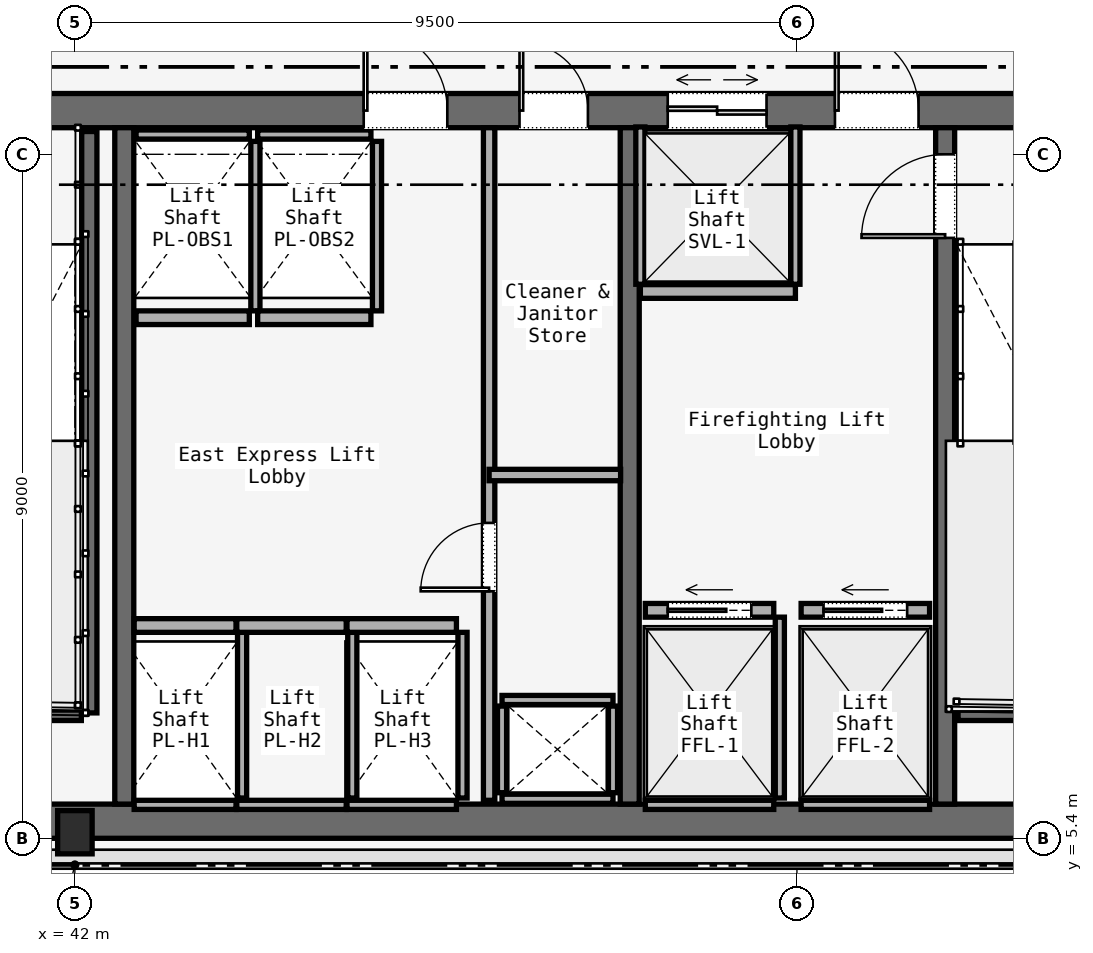
"""IFC4 building model, lengths in metres.
Left out: names, types, materials, properties, quantities, classifications, styles, units other than length and angle.
Written with IfcOpenShell. Run it as: python <this file> out.ifc"""

import sys

from ifc_helpers import new_model, si_unit, direction, frame, frame_2d, origin, origin_2d, place, context, subcontext, project, spatial, rectangle, i_section, extrude, element, fill, save


model = new_model("IFC4")
c1 = context("Model", 3, precision=1e-05, world=origin(), true_north=direction((0.0, 1.0)))
c2 = subcontext(c1, "Body", "Model", "MODEL_VIEW")
j1 = project(units=[si_unit("LENGTHUNIT", "METRE"), si_unit("PLANEANGLEUNIT", "RADIAN")], contexts=[c1])
p1 = place(None, origin())
s1 = spatial("IfcSite", under=j1, at=p1, CompositionType="ELEMENT")
p2 = place(p1, origin())
s2 = spatial("IfcBuilding", under=s1, at=p2, CompositionType="ELEMENT")
p3 = place(p2, frame((0.0, 0.0, 36.0)))
s3 = spatial("IfcBuildingStorey", under=s2, at=p3, CompositionType="ELEMENT", Elevation=36.0)
p4 = place(p3, frame((26.45, 14.975, 0.0), z_axis=(0.0, 0.0, 1.0), x_axis=(1.0, 0.0, 0.0)))
e1 = element("IfcWall", 1, at=p4, inside=s3, PredefinedType="SOLIDWALL", context=c2, shape_type="SweptSolid", body=[
    extrude(rectangle(XDim=31.1, YDim=0.45, at=frame_2d((15.55, 0.0))), origin(), (0.0, 0.0, 1.0), 3.58),
])
p5 = place(p4, frame((1.65, 0.0, 0.0)))
e2 = element("IfcOpeningElement", 2, at=p5, cuts=e1, PredefinedType="OPENING", context=c2, shape_type="SweptSolid", body=[
    extrude(rectangle(XDim=1.1, YDim=2.2, at=frame_2d((0.55, 1.1))), frame((0.0, 0.225, 0.0), z_axis=(0.0, -1.0, 0.0), x_axis=(1.0, 0.0, 0.0)), (0.0, 0.0, 1.0), 0.45),
])
p6 = place(p4, frame((13.65, 0.0, 0.0)))
e3 = element("IfcOpeningElement", 3, at=p6, cuts=e1, PredefinedType="OPENING", context=c2, shape_type="SweptSolid", body=[
    extrude(rectangle(XDim=1.1, YDim=2.2, at=frame_2d((0.55, 1.1))), frame((0.0, 0.225, 0.0), z_axis=(0.0, -1.0, 0.0), x_axis=(1.0, 0.0, 0.0)), (0.0, 0.0, 1.0), 0.45),
])
p7 = place(p4, frame((25.55, 0.0, 0.0)))
e4 = element("IfcOpeningElement", 4, at=p7, cuts=e1, PredefinedType="OPENING", context=c2, shape_type="SweptSolid", body=[
    extrude(rectangle(XDim=1.1, YDim=2.2, at=frame_2d((0.55, 1.1))), frame((0.0, 0.225, 0.0), z_axis=(0.0, -1.0, 0.0), x_axis=(1.0, 0.0, 0.0)), (0.0, 0.0, 1.0), 0.45),
])
p8 = place(p4, frame((10.7, 0.0, 0.0)))
e5 = element("IfcOpeningElement", 5, at=p8, cuts=e1, PredefinedType="OPENING", context=c2, shape_type="SweptSolid", body=[
    extrude(rectangle(XDim=1.4, YDim=2.2, at=frame_2d((0.7, 1.1))), frame((0.0, 0.225, 0.0), z_axis=(0.0, -1.0, 0.0), x_axis=(1.0, 0.0, 0.0)), (0.0, 0.0, 1.0), 0.45),
])
p9 = place(p4, frame((19.35, 0.0, 0.0)))
e6 = element("IfcOpeningElement", 6, at=p9, cuts=e1, PredefinedType="OPENING", context=c2, shape_type="SweptSolid", body=[
    extrude(rectangle(XDim=1.1, YDim=2.2, at=frame_2d((0.55, 1.1))), frame((0.0, 0.225, 0.0), z_axis=(0.0, -1.0, 0.0), x_axis=(1.0, 0.0, 0.0)), (0.0, 0.0, 1.0), 0.45),
])
p10 = place(p4, frame((21.4, 0.0, 0.0)))
e7 = element("IfcOpeningElement", 7, at=p10, cuts=e1, PredefinedType="OPENING", context=c2, shape_type="SweptSolid", body=[
    extrude(rectangle(XDim=0.9, YDim=2.1, at=frame_2d((0.45, 1.05))), frame((0.0, 0.225, 0.0), z_axis=(0.0, -1.0, 0.0), x_axis=(1.0, 0.0, 0.0)), (0.0, 0.0, 1.0), 0.45),
])
p11 = place(p4, frame((23.35, 0.0, 0.0)))
e8 = element("IfcOpeningElement", 8, at=p11, cuts=e1, PredefinedType="OPENING", context=c2, shape_type="SweptSolid", body=[
    extrude(rectangle(XDim=1.3, YDim=2.3, at=frame_2d((0.65, 1.15))), frame((0.0, 0.225, 0.0), z_axis=(0.0, -1.0, 0.0), x_axis=(1.0, 0.0, 0.0)), (0.0, 0.0, 1.0), 0.45),
])
p12 = place(p3, frame((26.45, 5.625, 0.0), z_axis=(0.0, 0.0, 1.0), x_axis=(1.0, 0.0, 0.0)))
e9 = element("IfcWall", 9, at=p12, inside=s3, PredefinedType="SOLIDWALL", context=c2, shape_type="SweptSolid", body=[
    extrude(rectangle(XDim=31.1, YDim=0.45, at=frame_2d((15.55, 0.0))), origin(), (0.0, 0.0, 1.0), 3.58),
])
for number, where, z_axis, x_axis in (
    (10, (42.65, 5.85, 0.0), (0.0, 0.0, 1.0), (0.0, 1.0, 0.0)),
    (11, (49.3, 5.85, 0.0), (0.0, 0.0, 1.0), (0.0, 1.0, 0.0)),
):
    element("IfcWall", number, at=place(p3, frame(where, z_axis=z_axis, x_axis=x_axis)), inside=s3, PredefinedType="SOLIDWALL", context=c2, shape_type="SweptSolid", body=[
        extrude(rectangle(XDim=8.9, YDim=0.25, at=frame_2d((4.45, 0.0))), origin(), (0.0, 0.0, 1.0), 3.58),
    ])
p13 = place(p3, frame((53.45, 5.85, 0.0), z_axis=(0.0, 0.0, 1.0), x_axis=(0.0, 1.0, 0.0)))
e12 = element("IfcWall", 12, at=p13, inside=s3, PredefinedType="SOLIDWALL", context=c2, shape_type="SweptSolid", body=[
    extrude(rectangle(XDim=8.9, YDim=0.25, at=frame_2d((4.45, 0.0))), origin(), (0.0, 0.0, 1.0), 3.58),
])
p14 = place(p13, frame((7.45, 0.0, 0.0)))
e13 = element("IfcOpeningElement", 13, at=p14, cuts=e12, PredefinedType="OPENING", context=c2, shape_type="SweptSolid", body=[
    extrude(rectangle(XDim=1.1, YDim=2.2, at=frame_2d((0.55, 1.1))), frame((0.0, 0.125, 0.0), z_axis=(0.0, -1.0, 0.0), x_axis=(1.0, 0.0, 0.0)), (0.0, 0.0, 1.0), 0.25),
])
p15 = place(p3, frame((42.0, 5.48, 0.0), z_axis=(0.0, 0.0, 1.0), x_axis=(1.0, 0.0, 0.0)))
e14 = element("IfcColumn", 14, at=p15, inside=s3, PredefinedType="COLUMN", context=c2, shape_type="SweptSolid", body=[
    extrude(i_section(OverallWidth=0.454, OverallDepth=0.569, WebThickness=0.078, FlangeThickness=0.08, FilletRadius=0.015, at=origin_2d()), origin(), (0.0, 0.0, 1.0), 3.58),
])
p16 = place(p3, frame((42.19, 14.7, 0.0), z_axis=(0.0, 0.0, 1.0), x_axis=(0.0, -1.0, 0.0)))
e15 = element("IfcWall", 15, at=p16, inside=s3, PredefinedType="SOLIDWALL", context=c2, shape_type="SweptSolid", body=[
    extrude(rectangle(XDim=7.65, YDim=0.2, at=frame_2d((3.825, 0.0))), origin(), (0.0, 0.0, 1.0), 3.8),
])
for number, where, z_axis, x_axis in (
    (16, (38.97, 7.05, 0.0), (0.0, 0.0, 1.0), (1.0, 0.0, 0.0)),
    (17, (53.62, 7.05, 0.0), (0.0, 0.0, 1.0), (1.0, 0.0, 0.0)),
):
    element("IfcWall", number, at=place(p3, frame(where, z_axis=z_axis, x_axis=x_axis)), inside=s3, PredefinedType="SOLIDWALL", context=c2, shape_type="SweptSolid", body=[
        extrude(rectangle(XDim=3.115, YDim=0.2, at=frame_2d((1.558, 0.0))), origin(), (0.0, 0.0, 1.0), 3.8),
    ])
for number, where, z_axis, x_axis in (
    (18, (47.62, 5.92, 0.0), (0.0, 0.0, 1.0), (1.0, 0.0, 0.0)),
    (19, (47.62, 7.22, 0.0), (0.0, 0.0, 1.0), (1.0, 0.0, 0.0)),
):
    element("IfcWall", number, at=place(p3, frame(where, z_axis=z_axis, x_axis=x_axis)), inside=s3, PredefinedType="SOLIDWALL", context=c2, shape_type="SweptSolid", body=[
        extrude(rectangle(XDim=1.46, YDim=0.12, at=frame_2d((0.73, 0.0))), origin(), (0.0, 0.0, 1.0), 2.933),
    ])
for number, where, z_axis, x_axis in (
    (20, (47.62, 6.0, 0.0), (0.0, 0.0, 1.0), (0.0, 1.0, 0.0)),
    (21, (49.08, 6.0, 0.0), (0.0, 0.0, 1.0), (0.0, 1.0, 0.0)),
):
    element("IfcWall", number, at=place(p3, frame(where, z_axis=z_axis, x_axis=x_axis)), inside=s3, PredefinedType="SOLIDWALL", context=c2, shape_type="SweptSolid", body=[
        extrude(rectangle(XDim=1.14, YDim=0.12, at=frame_2d((0.57, 0.0))), origin(), (0.0, 0.0, 1.0), 2.933),
    ])
p17 = place(p3, frame((47.45, 5.9, 0.0), z_axis=(0.0, 0.0, 1.0), x_axis=(0.0, 1.0, 0.0)))
e22 = element("IfcWall", 22, at=p17, inside=s3, PredefinedType="PARTITIONING", context=c2, shape_type="SweptSolid", body=[
    extrude(rectangle(XDim=8.85, YDim=0.15, at=frame_2d((4.425, 0.0))), origin(), (0.0, 0.0, 1.0), 2.933),
])
p18 = place(p17, frame((2.75, 0.0, 0.0)))
e23 = element("IfcOpeningElement", 23, at=p18, cuts=e22, PredefinedType="OPENING", context=c2, shape_type="SweptSolid", body=[
    extrude(rectangle(XDim=0.9, YDim=2.1, at=frame_2d((0.45, 1.05))), frame((0.0, 0.075, 0.0), z_axis=(0.0, -1.0, 0.0), x_axis=(1.0, 0.0, 0.0)), (0.0, 0.0, 1.0), 0.15),
])
p19 = place(p3, frame((47.45, 10.18, 0.0), z_axis=(0.0, 0.0, 1.0), x_axis=(1.0, 0.0, 0.0)))
e24 = element("IfcWall", 24, at=p19, inside=s3, PredefinedType="PARTITIONING", context=c2, shape_type="SweptSolid", body=[
    extrude(rectangle(XDim=1.73, YDim=0.15, at=frame_2d((0.865, 0.0))), origin(), (0.0, 0.0, 1.0), 2.933),
])
p20 = place(p3, frame((42.78, 8.2, 0.0), z_axis=(0.0, 0.0, 1.0), x_axis=(1.0, 0.0, 0.0)))
e25 = element("IfcWall", 25, at=p20, inside=s3, PredefinedType="SOLIDWALL", context=c2, shape_type="SweptSolid", body=[
    extrude(rectangle(XDim=1.34, YDim=0.18, at=frame_2d((0.67, 0.0))), origin(), (0.0, 0.0, 1.0), 2.933),
])
p21 = place(p3, frame((42.78, 5.84, 0.0), z_axis=(0.0, 0.0, 1.0), x_axis=(1.0, 0.0, 0.0)))
e26 = element("IfcWall", 26, at=p21, inside=s3, PredefinedType="SOLIDWALL", context=c2, shape_type="SweptSolid", body=[
    extrude(rectangle(XDim=1.34, YDim=0.12, at=frame_2d((0.67, 0.0))), origin(), (0.0, 0.0, 1.0), 2.933),
])
p22 = place(p3, frame((44.2, 5.93, 0.0), z_axis=(0.0, 0.0, 1.0), x_axis=(0.0, 1.0, 0.0)))
e27 = element("IfcWall", 27, at=p22, inside=s3, PredefinedType="SOLIDWALL", context=c2, shape_type="SweptSolid", body=[
    extrude(rectangle(XDim=2.18, YDim=0.12, at=frame_2d((1.09, 0.0))), origin(), (0.0, 0.0, 1.0), 2.933),
])
p23 = place(p3, frame((44.13, 8.2, 0.0), z_axis=(0.0, 0.0, 1.0), x_axis=(1.0, 0.0, 0.0)))
e28 = element("IfcWall", 28, at=p23, inside=s3, PredefinedType="SOLIDWALL", context=c2, shape_type="SweptSolid", body=[
    extrude(rectangle(XDim=1.44, YDim=0.18, at=frame_2d((0.72, 0.0))), origin(), (0.0, 0.0, 1.0), 2.933),
])
p24 = place(p3, frame((44.13, 5.84, 0.0), z_axis=(0.0, 0.0, 1.0), x_axis=(1.0, 0.0, 0.0)))
e29 = element("IfcWall", 29, at=p24, inside=s3, PredefinedType="SOLIDWALL", context=c2, shape_type="SweptSolid", body=[
    extrude(rectangle(XDim=1.44, YDim=0.12, at=frame_2d((0.72, 0.0))), origin(), (0.0, 0.0, 1.0), 2.933),
])
p25 = place(p3, frame((45.65, 5.93, 0.0), z_axis=(0.0, 0.0, 1.0), x_axis=(0.0, 1.0, 0.0)))
e30 = element("IfcWall", 30, at=p25, inside=s3, PredefinedType="SOLIDWALL", context=c2, shape_type="SweptSolid", body=[
    extrude(rectangle(XDim=2.18, YDim=0.12, at=frame_2d((1.09, 0.0))), origin(), (0.0, 0.0, 1.0), 2.933),
])
p26 = place(p3, frame((45.58, 8.2, 0.0), z_axis=(0.0, 0.0, 1.0), x_axis=(1.0, 0.0, 0.0)))
e31 = element("IfcWall", 31, at=p26, inside=s3, PredefinedType="SOLIDWALL", context=c2, shape_type="SweptSolid", body=[
    extrude(rectangle(XDim=1.44, YDim=0.18, at=frame_2d((0.72, 0.0))), origin(), (0.0, 0.0, 1.0), 2.933),
])
p27 = place(p3, frame((45.58, 5.84, 0.0), z_axis=(0.0, 0.0, 1.0), x_axis=(1.0, 0.0, 0.0)))
e32 = element("IfcWall", 32, at=p27, inside=s3, PredefinedType="SOLIDWALL", context=c2, shape_type="SweptSolid", body=[
    extrude(rectangle(XDim=1.44, YDim=0.12, at=frame_2d((0.72, 0.0))), origin(), (0.0, 0.0, 1.0), 2.933),
])
p28 = place(p3, frame((47.1, 5.93, 0.0), z_axis=(0.0, 0.0, 1.0), x_axis=(0.0, 1.0, 0.0)))
e33 = element("IfcWall", 33, at=p28, inside=s3, PredefinedType="SOLIDWALL", context=c2, shape_type="SweptSolid", body=[
    extrude(rectangle(XDim=2.18, YDim=0.12, at=frame_2d((1.09, 0.0))), origin(), (0.0, 0.0, 1.0), 2.933),
])
p29 = place(p3, frame((42.805, 12.25, 0.0), z_axis=(0.0, 0.0, 1.0), x_axis=(1.0, 0.0, 0.0)))
e34 = element("IfcWall", 34, at=p29, inside=s3, PredefinedType="SOLIDWALL", context=c2, shape_type="SweptSolid", body=[
    extrude(rectangle(XDim=1.49, YDim=0.18, at=frame_2d((0.745, 0.0))), origin(), (0.0, 0.0, 1.0), 2.933),
])
p30 = place(p3, frame((42.805, 14.66, 0.0), z_axis=(0.0, 0.0, 1.0), x_axis=(1.0, 0.0, 0.0)))
e35 = element("IfcWall", 35, at=p30, inside=s3, PredefinedType="SOLIDWALL", context=c2, shape_type="SweptSolid", body=[
    extrude(rectangle(XDim=1.49, YDim=0.12, at=frame_2d((0.745, 0.0))), origin(), (0.0, 0.0, 1.0), 2.933),
])
p31 = place(p3, frame((44.375, 12.34, 0.0), z_axis=(0.0, 0.0, 1.0), x_axis=(0.0, 1.0, 0.0)))
e36 = element("IfcWall", 36, at=p31, inside=s3, PredefinedType="SOLIDWALL", context=c2, shape_type="SweptSolid", body=[
    extrude(rectangle(XDim=2.23, YDim=0.12, at=frame_2d((1.115, 0.0))), origin(), (0.0, 0.0, 1.0), 2.933),
])
p32 = place(p3, frame((44.405, 12.25, 0.0), z_axis=(0.0, 0.0, 1.0), x_axis=(1.0, 0.0, 0.0)))
e37 = element("IfcWall", 37, at=p32, inside=s3, PredefinedType="SOLIDWALL", context=c2, shape_type="SweptSolid", body=[
    extrude(rectangle(XDim=1.49, YDim=0.18, at=frame_2d((0.745, 0.0))), origin(), (0.0, 0.0, 1.0), 2.933),
])
p33 = place(p3, frame((44.405, 14.66, 0.0), z_axis=(0.0, 0.0, 1.0), x_axis=(1.0, 0.0, 0.0)))
e38 = element("IfcWall", 38, at=p33, inside=s3, PredefinedType="SOLIDWALL", context=c2, shape_type="SweptSolid", body=[
    extrude(rectangle(XDim=1.49, YDim=0.12, at=frame_2d((0.745, 0.0))), origin(), (0.0, 0.0, 1.0), 2.933),
])
p34 = place(p3, frame((45.975, 12.34, 0.0), z_axis=(0.0, 0.0, 1.0), x_axis=(0.0, 1.0, 0.0)))
e39 = element("IfcWall", 39, at=p34, inside=s3, PredefinedType="SOLIDWALL", context=c2, shape_type="SweptSolid", body=[
    extrude(rectangle(XDim=2.23, YDim=0.12, at=frame_2d((1.115, 0.0))), origin(), (0.0, 0.0, 1.0), 2.933),
])
p35 = place(p3, frame((49.505, 8.4, 0.0), z_axis=(0.0, 0.0, 1.0), x_axis=(1.0, 0.0, 0.0)))
e40 = element("IfcWall", 40, at=p35, inside=s3, PredefinedType="SOLIDWALL", context=c2, shape_type="SweptSolid", body=[
    extrude(rectangle(XDim=1.69, YDim=0.18, at=frame_2d((0.845, 0.0))), origin(), (0.0, 0.0, 1.0), 2.933),
])
p36 = place(p35, frame((0.295, 0.0, 0.0)))
e41 = element("IfcOpeningElement", 41, at=p36, cuts=e40, PredefinedType="OPENING", context=c2, shape_type="SweptSolid", body=[
    extrude(rectangle(XDim=1.1, YDim=2.2, at=frame_2d((0.55, 1.1))), frame((0.0, 0.09, 0.0), z_axis=(0.0, -1.0, 0.0), x_axis=(1.0, 0.0, 0.0)), (0.0, 0.0, 1.0), 0.18),
])
p37 = place(p3, frame((49.505, 5.84, 0.0), z_axis=(0.0, 0.0, 1.0), x_axis=(1.0, 0.0, 0.0)))
e42 = element("IfcWall", 42, at=p37, inside=s3, PredefinedType="SOLIDWALL", context=c2, shape_type="SweptSolid", body=[
    extrude(rectangle(XDim=1.69, YDim=0.12, at=frame_2d((0.845, 0.0))), origin(), (0.0, 0.0, 1.0), 2.933),
])
p38 = place(p3, frame((51.275, 5.93, 0.0), z_axis=(0.0, 0.0, 1.0), x_axis=(0.0, 1.0, 0.0)))
e43 = element("IfcWall", 43, at=p38, inside=s3, PredefinedType="SOLIDWALL", context=c2, shape_type="SweptSolid", body=[
    extrude(rectangle(XDim=2.38, YDim=0.12, at=frame_2d((1.19, 0.0))), origin(), (0.0, 0.0, 1.0), 2.933),
])
p39 = place(p3, frame((51.555, 8.4, 0.0), z_axis=(0.0, 0.0, 1.0), x_axis=(1.0, 0.0, 0.0)))
e44 = element("IfcWall", 44, at=p39, inside=s3, PredefinedType="SOLIDWALL", context=c2, shape_type="SweptSolid", body=[
    extrude(rectangle(XDim=1.69, YDim=0.18, at=frame_2d((0.845, 0.0))), origin(), (0.0, 0.0, 1.0), 2.933),
])
p40 = place(p39, frame((0.295, 0.0, 0.0)))
e45 = element("IfcOpeningElement", 45, at=p40, cuts=e44, PredefinedType="OPENING", context=c2, shape_type="SweptSolid", body=[
    extrude(rectangle(XDim=1.1, YDim=2.2, at=frame_2d((0.55, 1.1))), frame((0.0, 0.09, 0.0), z_axis=(0.0, -1.0, 0.0), x_axis=(1.0, 0.0, 0.0)), (0.0, 0.0, 1.0), 0.18),
])
p41 = place(p3, frame((51.555, 5.84, 0.0), z_axis=(0.0, 0.0, 1.0), x_axis=(1.0, 0.0, 0.0)))
e46 = element("IfcWall", 46, at=p41, inside=s3, PredefinedType="SOLIDWALL", context=c2, shape_type="SweptSolid", body=[
    extrude(rectangle(XDim=1.69, YDim=0.12, at=frame_2d((0.845, 0.0))), origin(), (0.0, 0.0, 1.0), 2.933),
])
p42 = place(p3, frame((49.44, 12.595, 0.0), z_axis=(0.0, 0.0, 1.0), x_axis=(1.0, 0.0, 0.0)))
e47 = element("IfcWall", 47, at=p42, inside=s3, PredefinedType="SOLIDWALL", context=c2, shape_type="SweptSolid", body=[
    extrude(rectangle(XDim=2.04, YDim=0.18, at=frame_2d((1.02, 0.0))), origin(), (0.0, 0.0, 1.0), 2.933),
])
for number, where, z_axis, x_axis in (
    (48, (49.44, 12.69, 0.0), (0.0, 0.0, 1.0), (0.0, 1.0, 0.0)),
    (49, (51.48, 12.69, 0.0), (0.0, 0.0, 1.0), (0.0, 1.0, 0.0)),
):
    element("IfcWall", number, at=place(p3, frame(where, z_axis=z_axis, x_axis=x_axis)), inside=s3, PredefinedType="SOLIDWALL", context=c2, shape_type="SweptSolid", body=[
        extrude(rectangle(XDim=2.07, YDim=0.12, at=frame_2d((1.035, 0.0))), origin(), (0.0, 0.0, 1.0), 2.933),
    ])
p43 = place(p7, origin())
e50 = element("IfcDoor", 50, at=p43, inside=s3, OperationType="SINGLE_SWING_RIGHT", PredefinedType="DOOR", context=c2, shape_type="SweptSolid", body=[
    extrude(rectangle(XDim=1.1, YDim=2.2, at=frame_2d((0.55, 1.1))), frame((0.0, 0.025, 0.0), z_axis=(0.0, -1.0, 0.0), x_axis=(1.0, 0.0, 0.0)), (0.0, 0.0, 1.0), 0.05),
])
fill(e4, e50)
p44 = place(p9, origin())
e51 = element("IfcDoor", 51, at=p44, inside=s3, OperationType="SINGLE_SWING_LEFT", PredefinedType="DOOR", context=c2, shape_type="SweptSolid", body=[
    extrude(rectangle(XDim=1.1, YDim=2.2, at=frame_2d((0.55, 1.1))), frame((0.0, 0.025, 0.0), z_axis=(0.0, -1.0, 0.0), x_axis=(1.0, 0.0, 0.0)), (0.0, 0.0, 1.0), 0.05),
])
fill(e6, e51)
p45 = place(p10, origin())
e52 = element("IfcDoor", 52, at=p45, inside=s3, OperationType="SINGLE_SWING_LEFT", PredefinedType="DOOR", context=c2, shape_type="SweptSolid", body=[
    extrude(rectangle(XDim=0.9, YDim=2.1, at=frame_2d((0.45, 1.05))), frame((0.0, 0.025, 0.0), z_axis=(0.0, -1.0, 0.0), x_axis=(1.0, 0.0, 0.0)), (0.0, 0.0, 1.0), 0.05),
])
fill(e7, e52)
p46 = place(p14, origin())
e53 = element("IfcDoor", 53, at=p46, inside=s3, OperationType="SINGLE_SWING_LEFT", PredefinedType="DOOR", context=c2, shape_type="SweptSolid", body=[
    extrude(rectangle(XDim=1.1, YDim=2.2, at=frame_2d((0.55, 1.1))), frame((0.0, 0.025, 0.0), z_axis=(0.0, -1.0, 0.0), x_axis=(1.0, 0.0, 0.0)), (0.0, 0.0, 1.0), 0.05),
])
fill(e13, e53)
p47 = place(p18, origin())
e54 = element("IfcDoor", 54, at=p47, inside=s3, OperationType="SINGLE_SWING_RIGHT", PredefinedType="DOOR", context=c2, shape_type="SweptSolid", body=[
    extrude(rectangle(XDim=0.9, YDim=2.1, at=frame_2d((0.45, 1.05))), frame((0.0, 0.025, 0.0), z_axis=(0.0, -1.0, 0.0), x_axis=(1.0, 0.0, 0.0)), (0.0, 0.0, 1.0), 0.05),
])
fill(e23, e54)
p48 = place(p36, origin())
e55 = element("IfcDoor", 55, at=p48, inside=s3, OperationType="SLIDING_TO_LEFT", PredefinedType="DOOR", context=c2, shape_type="SweptSolid", body=[
    extrude(rectangle(XDim=1.1, YDim=2.2, at=frame_2d((0.55, 1.1))), frame((0.0, 0.025, 0.0), z_axis=(0.0, -1.0, 0.0), x_axis=(1.0, 0.0, 0.0)), (0.0, 0.0, 1.0), 0.05),
])
fill(e41, e55)
p49 = place(p40, origin())
e56 = element("IfcDoor", 56, at=p49, inside=s3, OperationType="SLIDING_TO_LEFT", PredefinedType="DOOR", context=c2, shape_type="SweptSolid", body=[
    extrude(rectangle(XDim=1.1, YDim=2.2, at=frame_2d((0.55, 1.1))), frame((0.0, 0.025, 0.0), z_axis=(0.0, -1.0, 0.0), x_axis=(1.0, 0.0, 0.0)), (0.0, 0.0, 1.0), 0.05),
])
fill(e45, e56)
p50 = place(p11, origin())
e57 = element("IfcDoor", 57, at=p50, inside=s3, OperationType="DOUBLE_DOOR_SLIDING", PredefinedType="DOOR", context=c2, shape_type="SweptSolid", body=[
    extrude(rectangle(XDim=1.3, YDim=2.3, at=frame_2d((0.65, 1.15))), frame((0.0, 0.025, 0.0), z_axis=(0.0, -1.0, 0.0), x_axis=(1.0, 0.0, 0.0)), (0.0, 0.0, 1.0), 0.05),
])
fill(e8, e57)
save(model, sys.argv[1])
